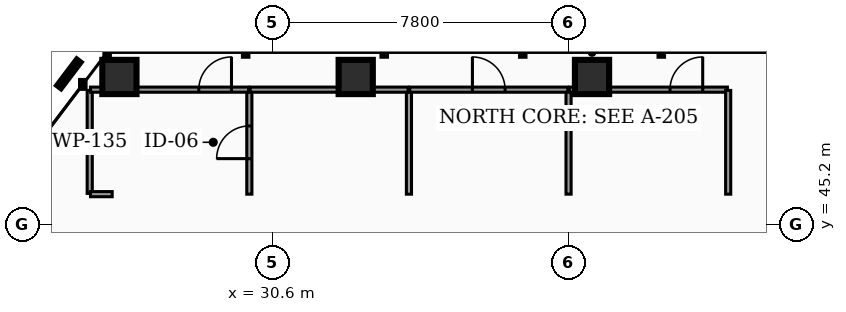
"""IFC4 building model, lengths in metres.
Left out: names, types, materials, properties, quantities, classifications, styles, units other than length and angle.
Written with IfcOpenShell. Run it as: python <this file> out.ifc"""

import sys

from ifc_helpers import new_model, si_unit, direction, frame, frame_2d, origin, origin_2d, place, context, subcontext, project, spatial, rectangle, hollow_rectangle, extrude, element, fill, save


model = new_model("IFC4")
c1 = context("Model", 3, precision=1e-05, world=origin(), true_north=direction((0.0, 1.0)))
c2 = subcontext(c1, "Body", "Model", "MODEL_VIEW")
j1 = project(units=[si_unit("LENGTHUNIT", "METRE"), si_unit("PLANEANGLEUNIT", "RADIAN")], contexts=[c1])
p1 = place(None, origin())
s1 = spatial("IfcSite", under=j1, at=p1, CompositionType="ELEMENT")
p2 = place(p1, origin())
s2 = spatial("IfcBuilding", under=s1, at=p2, CompositionType="ELEMENT")
p3 = place(p2, frame((0.0, 0.0, 76.5)))
s3 = spatial("IfcBuildingStorey", under=s2, at=p3, CompositionType="ELEMENT", Elevation=76.5)
for number, where, z_axis, x_axis in (
    (1, (39.017, 49.083, 0.0), (0.0, 0.0, 1.0), (1.0, 0.0, 0.0)),
    (2, (32.799, 49.083, 0.0), (0.0, 0.0, 1.0), (1.0, 0.0, 0.0)),
    (3, (26.581, 49.083, 0.0), (0.0, 0.0, 1.0), (1.0, 0.0, 0.0)),
):
    element("IfcColumn", number, at=place(p3, frame(where, z_axis=z_axis, x_axis=x_axis)), inside=s3, PredefinedType="COLUMN", context=c2, shape_type="SweptSolid", body=[
        extrude(hollow_rectangle(XDim=0.9, YDim=0.9, WallThickness=0.045, at=origin_2d()), origin(), (0.0, 0.0, 1.0), 3.82),
    ])
p4 = place(p3, frame((30.0, 46.0, 0.0), z_axis=(0.0, 0.0, 1.0), x_axis=(0.0, 1.0, 0.0)))
e4 = element("IfcWall", 4, at=p4, inside=s3, PredefinedType="PARTITIONING", context=c2, shape_type="SweptSolid", body=[
    extrude(rectangle(XDim=2.73, YDim=0.135, at=frame_2d((1.365, 0.0))), origin(), (0.0, 0.0, 1.0), 2.777),
])
p5 = place(p4, frame((0.935, 0.0, 0.0)))
e5 = element("IfcOpeningElement", 5, at=p5, cuts=e4, PredefinedType="OPENING", context=c2, shape_type="SweptSolid", body=[
    extrude(rectangle(XDim=0.86, YDim=2.05, at=frame_2d((0.43, 1.025))), frame((0.0, 0.077, 0.0), z_axis=(0.0, -1.0, 0.0), x_axis=(1.0, 0.0, 0.0)), (0.0, 0.0, 1.0), 0.155),
])
p6 = place(p3, frame((25.8, 46.02, 0.0), z_axis=(0.0, 0.0, 1.0), x_axis=(0.0, 1.0, 0.0)))
e6 = element("IfcWall", 6, at=p6, inside=s3, PredefinedType="PARTITIONING", context=c2, shape_type="SweptSolid", body=[
    extrude(rectangle(XDim=2.71, YDim=0.135, at=frame_2d((1.355, 0.0))), origin(), (0.0, 0.0, 1.0), 2.777),
])
p7 = place(p3, frame((25.82, 48.75, 0.0), z_axis=(0.0, 0.0, 1.0), x_axis=(1.0, 0.0, 0.0)))
e7 = element("IfcWall", 7, at=p7, inside=s3, PredefinedType="PARTITIONING", context=c2, shape_type="SweptSolid", body=[
    extrude(rectangle(XDim=4.16, YDim=0.135, at=frame_2d((2.08, 0.0))), origin(), (0.0, 0.0, 1.0), 2.777),
])
p8 = place(p7, frame((2.85, 0.0, 0.0)))
e8 = element("IfcOpeningElement", 8, at=p8, cuts=e7, PredefinedType="OPENING", context=c2, shape_type="SweptSolid", body=[
    extrude(rectangle(XDim=0.86, YDim=2.05, at=frame_2d((0.43, 1.025))), frame((0.0, 0.077, 0.0), z_axis=(0.0, -1.0, 0.0), x_axis=(1.0, 0.0, 0.0)), (0.0, 0.0, 1.0), 0.155),
])
p9 = place(p3, frame((25.82, 46.0, 0.0), z_axis=(0.0, 0.0, 1.0), x_axis=(1.0, 0.0, 0.0)))
e9 = element("IfcWall", 9, at=p9, inside=s3, PredefinedType="PARTITIONING", context=c2, shape_type="SweptSolid", body=[
    extrude(rectangle(XDim=0.571, YDim=0.135, at=frame_2d((0.285, 0.0))), origin(), (0.0, 0.0, 1.0), 2.777),
])
p10 = place(p3, frame((34.2, 46.0, 0.0), z_axis=(0.0, 0.0, 1.0), x_axis=(0.0, 1.0, 0.0)))
e10 = element("IfcWall", 10, at=p10, inside=s3, PredefinedType="PARTITIONING", context=c2, shape_type="SweptSolid", body=[
    extrude(rectangle(XDim=2.73, YDim=0.135, at=frame_2d((1.365, 0.0))), origin(), (0.0, 0.0, 1.0), 2.777),
])
p11 = place(p3, frame((30.02, 48.75, 0.0), z_axis=(0.0, 0.0, 1.0), x_axis=(1.0, 0.0, 0.0)))
e11 = element("IfcWall", 11, at=p11, inside=s3, PredefinedType="PARTITIONING", context=c2, shape_type="SweptSolid", body=[
    extrude(rectangle(XDim=4.16, YDim=0.135, at=frame_2d((2.08, 0.0))), origin(), (0.0, 0.0, 1.0), 2.777),
])
p12 = place(p3, frame((38.4, 46.0, 0.0), z_axis=(0.0, 0.0, 1.0), x_axis=(0.0, 1.0, 0.0)))
e12 = element("IfcWall", 12, at=p12, inside=s3, PredefinedType="PARTITIONING", context=c2, shape_type="SweptSolid", body=[
    extrude(rectangle(XDim=2.73, YDim=0.135, at=frame_2d((1.365, 0.0))), origin(), (0.0, 0.0, 1.0), 2.777),
])
p13 = place(p3, frame((34.22, 48.75, 0.0), z_axis=(0.0, 0.0, 1.0), x_axis=(1.0, 0.0, 0.0)))
e13 = element("IfcWall", 13, at=p13, inside=s3, PredefinedType="PARTITIONING", context=c2, shape_type="SweptSolid", body=[
    extrude(rectangle(XDim=4.16, YDim=0.135, at=frame_2d((2.08, 0.0))), origin(), (0.0, 0.0, 1.0), 2.777),
])
p14 = place(p13, frame((1.65, 0.0, 0.0)))
e14 = element("IfcOpeningElement", 14, at=p14, cuts=e13, PredefinedType="OPENING", context=c2, shape_type="SweptSolid", body=[
    extrude(rectangle(XDim=0.86, YDim=2.05, at=frame_2d((0.43, 1.025))), frame((0.0, 0.077, 0.0), z_axis=(0.0, -1.0, 0.0), x_axis=(1.0, 0.0, 0.0)), (0.0, 0.0, 1.0), 0.155),
])
p15 = place(p3, frame((38.42, 48.75, 0.0), z_axis=(0.0, 0.0, 1.0), x_axis=(1.0, 0.0, 0.0)))
e15 = element("IfcWall", 15, at=p15, inside=s3, PredefinedType="PARTITIONING", context=c2, shape_type="SweptSolid", body=[
    extrude(rectangle(XDim=4.16, YDim=0.135, at=frame_2d((2.08, 0.0))), origin(), (0.0, 0.0, 1.0), 2.777),
])
p16 = place(p15, frame((2.65, 0.0, 0.0)))
e16 = element("IfcOpeningElement", 16, at=p16, cuts=e15, PredefinedType="OPENING", context=c2, shape_type="SweptSolid", body=[
    extrude(rectangle(XDim=0.86, YDim=2.05, at=frame_2d((0.43, 1.025))), frame((0.0, 0.077, 0.0), z_axis=(0.0, -1.0, 0.0), x_axis=(1.0, 0.0, 0.0)), (0.0, 0.0, 1.0), 0.155),
])
p17 = place(p3, frame((42.6, 46.0, 0.0), z_axis=(0.0, 0.0, 1.0), x_axis=(0.0, 1.0, 0.0)))
e17 = element("IfcWall", 17, at=p17, inside=s3, PredefinedType="PARTITIONING", context=c2, shape_type="SweptSolid", body=[
    extrude(rectangle(XDim=2.73, YDim=0.135, at=frame_2d((1.365, 0.0))), origin(), (0.0, 0.0, 1.0), 2.777),
])
p18 = place(p5, origin())
e18 = element("IfcDoor", 18, at=p18, inside=s3, OperationType="SINGLE_SWING_LEFT", PredefinedType="DOOR", context=c2, shape_type="SweptSolid", body=[
    extrude(rectangle(XDim=0.86, YDim=2.05, at=frame_2d((0.43, 1.025))), frame((0.0, 0.025, 0.0), z_axis=(0.0, -1.0, 0.0), x_axis=(1.0, 0.0, 0.0)), (0.0, 0.0, 1.0), 0.05),
])
fill(e5, e18)
p19 = place(p8, origin())
e19 = element("IfcDoor", 19, at=p19, inside=s3, OperationType="SINGLE_SWING_RIGHT", PredefinedType="DOOR", context=c2, shape_type="SweptSolid", body=[
    extrude(rectangle(XDim=0.86, YDim=2.05, at=frame_2d((0.43, 1.025))), frame((0.0, 0.025, 0.0), z_axis=(0.0, -1.0, 0.0), x_axis=(1.0, 0.0, 0.0)), (0.0, 0.0, 1.0), 0.05),
])
fill(e8, e19)
p20 = place(p14, origin())
e20 = element("IfcDoor", 20, at=p20, inside=s3, OperationType="SINGLE_SWING_LEFT", PredefinedType="DOOR", context=c2, shape_type="SweptSolid", body=[
    extrude(rectangle(XDim=0.86, YDim=2.05, at=frame_2d((0.43, 1.025))), frame((0.0, 0.025, 0.0), z_axis=(0.0, -1.0, 0.0), x_axis=(1.0, 0.0, 0.0)), (0.0, 0.0, 1.0), 0.05),
])
fill(e14, e20)
p21 = place(p16, origin())
e21 = element("IfcDoor", 21, at=p21, inside=s3, OperationType="SINGLE_SWING_RIGHT", PredefinedType="DOOR", context=c2, shape_type="SweptSolid", body=[
    extrude(rectangle(XDim=0.86, YDim=2.05, at=frame_2d((0.43, 1.025))), frame((0.0, 0.025, 0.0), z_axis=(0.0, -1.0, 0.0), x_axis=(1.0, 0.0, 0.0)), (0.0, 0.0, 1.0), 0.05),
])
fill(e16, e21)
save(model, sys.argv[1])
